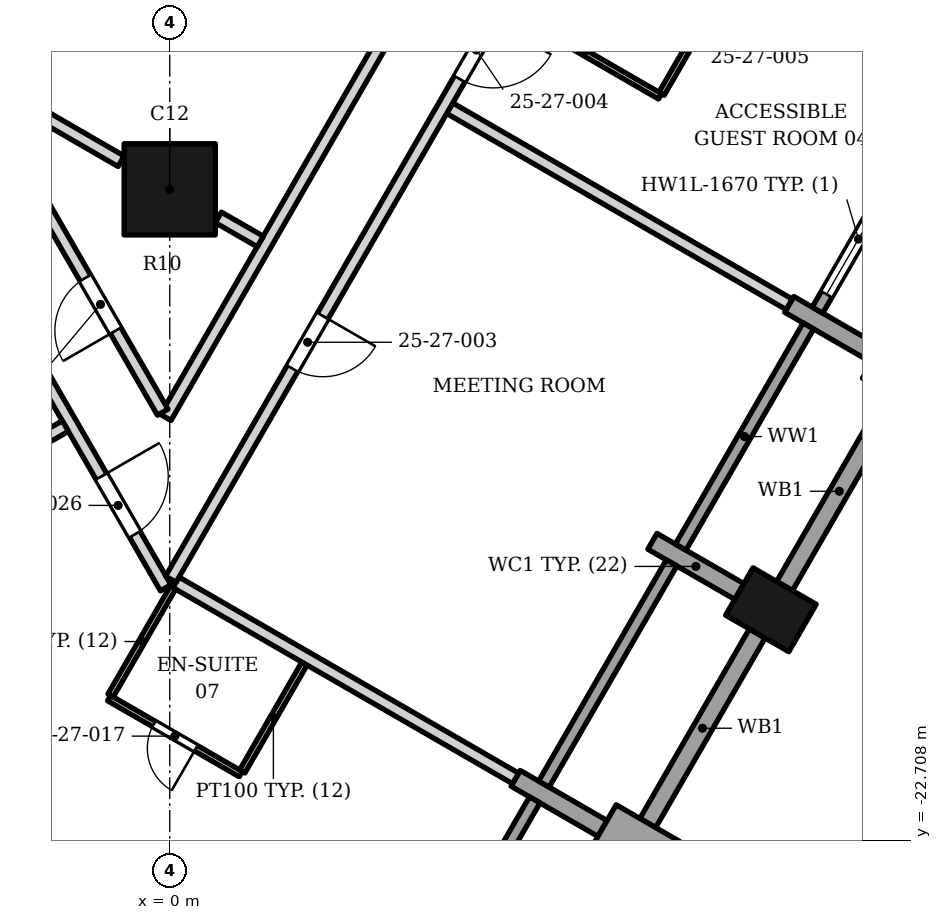
"""IFC4 building model, lengths in metres.
Left out: names, types, materials, properties, quantities, classifications, styles, units other than length and angle.
Written with IfcOpenShell. Run it as: python <this file> out.ifc"""

import sys

from ifc_helpers import new_model, si_unit, direction, frame, frame_2d, origin, origin_2d, place, context, subcontext, project, spatial, rectangle, extrude, element, fill, save


model = new_model("IFC4")
c1 = context("Model", 3, precision=1e-05, world=origin(), true_north=direction((0.0, 1.0)))
c2 = subcontext(c1, "Body", "Model", "MODEL_VIEW")
j1 = project(units=[si_unit("LENGTHUNIT", "METRE"), si_unit("PLANEANGLEUNIT", "RADIAN")], contexts=[c1])
p1 = place(None, origin())
s1 = spatial("IfcSite", under=j1, at=p1, CompositionType="ELEMENT")
p2 = place(p1, origin())
s2 = spatial("IfcBuilding", under=s1, at=p2, CompositionType="ELEMENT")
p3 = place(p2, frame((0.0, 0.0, 112.2)))
s3 = spatial("IfcBuildingStorey", under=s2, at=p3, CompositionType="ELEMENT", Elevation=112.2)
p4 = place(p3, frame((0.0, -12.0, 0.0), z_axis=(0.0, 0.0, 1.0), x_axis=(1.0, 0.0, 0.0)))
e1 = element("IfcColumn", 1, at=p4, inside=s3, PredefinedType="COLUMN", context=c2, shape_type="SweptSolid", body=[
    extrude(rectangle(XDim=1.5, YDim=1.5, at=origin_2d()), origin(), (0.0, 0.0, 1.0), 3.4),
])
p5 = place(p3, frame((9.887, -18.914, 0.0), z_axis=(0.0, 0.0, 1.0), x_axis=(0.5, 0.866025403784, 0.0)))
e2 = element("IfcColumn", 2, at=p5, inside=s3, PredefinedType="COLUMN", context=c2, shape_type="SweptSolid", body=[
    extrude(rectangle(XDim=0.9, YDim=1.2, at=origin_2d()), origin(), (0.0, 0.0, 1.0), 3.4),
])
p6 = place(p3, frame((8.156, -23.111, 0.0), z_axis=(0.0, 0.0, 1.0), x_axis=(-0.866006032174, 0.500033551112, 0.0)))
e3 = element("IfcWall", 3, at=p6, inside=s3, PredefinedType="SOLIDWALL", context=c2, shape_type="SweptSolid", body=[
    extrude(rectangle(XDim=1.2, YDim=0.9, at=frame_2d((0.6, 0.0))), origin(), (0.0, 0.0, 1.0), 2.63),
])
for number, where, z_axis, x_axis in (
    (4, (7.117, -22.511, 0.0), (0.0, 0.0, 1.0), (-0.866, 0.5, 0.0)),
    (5, (7.938, -17.789, 0.0), (0.0, 0.0, 1.0), (0.866, -0.5, 0.0)),
):
    element("IfcWall", number, at=place(p3, frame(where, z_axis=z_axis, x_axis=x_axis)), inside=s3, PredefinedType="SOLIDWALL", context=c2, shape_type="SweptSolid", body=[
        extrude(rectangle(XDim=1.65, YDim=0.3, at=frame_2d((0.825, 0.0))), origin(), (0.0, 0.0, 1.0), 2.65),
    ])
p7 = place(p3, frame((12.656, -15.317, 0.0), z_axis=(0.0, 0.0, 1.0), x_axis=(-0.866006032174, 0.500033551112, 0.0)))
e6 = element("IfcWall", 6, at=p7, inside=s3, PredefinedType="SOLIDWALL", context=c2, shape_type="SweptSolid", body=[
    extrude(rectangle(XDim=1.2, YDim=0.9, at=frame_2d((0.6, 0.0))), origin(), (0.0, 0.0, 1.0), 2.63),
])
p8 = place(p3, frame((11.617, -14.717, 0.0), z_axis=(0.0, 0.0, 1.0), x_axis=(-0.866040211805, 0.499974350878, 0.0)))
e7 = element("IfcWall", 7, at=p8, inside=s3, PredefinedType="SOLIDWALL", context=c2, shape_type="SweptSolid", body=[
    extrude(rectangle(XDim=1.65, YDim=0.3, at=frame_2d((0.825, 0.0))), origin(), (0.0, 0.0, 1.0), 2.65),
])
p9 = place(p3, frame((3.903, -25.678, 0.0), z_axis=(0.0, 0.0, 1.0), x_axis=(0.49998411664, 0.866034573852, 0.0)))
e8 = element("IfcWall", 8, at=p9, inside=s3, PredefinedType="ELEMENTEDWALL", context=c2, shape_type="SweptSolid", body=[
    extrude(rectangle(XDim=4.2, YDim=0.2, at=frame_2d((2.1, 0.0))), origin(), (0.0, 0.0, 1.0), 2.552),
])
p10 = place(p3, frame((7.862, -22.421, 0.0), z_axis=(0.0, 0.0, 1.0), x_axis=(0.500012057535, 0.866018442252, 0.0)))
e9 = element("IfcWall", 9, at=p10, inside=s3, PredefinedType="SOLIDWALL", context=c2, shape_type="SweptSolid", body=[
    extrude(rectangle(XDim=3.6, YDim=0.3, at=frame_2d((1.8, 0.0))), origin(), (0.0, 0.0, 1.0), 2.63),
])
p11 = place(p3, frame((6.153, -21.781, 0.0), z_axis=(0.0, 0.0, 1.0), x_axis=(0.499958946799, 0.866049104564, 0.0)))
e10 = element("IfcWall", 10, at=p11, inside=s3, PredefinedType="ELEMENTEDWALL", context=c2, shape_type="SweptSolid", body=[
    extrude(rectangle(XDim=4.2, YDim=0.2, at=frame_2d((2.1, 0.0))), origin(), (0.0, 0.0, 1.0), 2.65),
])
p12 = place(p3, frame((10.112, -18.524, 0.0), z_axis=(0.0, 0.0, 1.0), x_axis=(0.500012057535, 0.866018442252, 0.0)))
e11 = element("IfcWall", 11, at=p12, inside=s3, PredefinedType="SOLIDWALL", context=c2, shape_type="SweptSolid", body=[
    extrude(rectangle(XDim=3.6, YDim=0.3, at=frame_2d((1.8, 0.0))), origin(), (0.0, 0.0, 1.0), 2.63),
])
p13 = place(p3, frame((8.403, -17.884, 0.0), z_axis=(0.0, 0.0, 1.0), x_axis=(0.49998411664, 0.866034573852, 0.0)))
e12 = element("IfcWall", 12, at=p13, inside=s3, PredefinedType="ELEMENTEDWALL", context=c2, shape_type="SweptSolid", body=[
    extrude(rectangle(XDim=4.2, YDim=0.2, at=frame_2d((2.1, 0.0))), origin(), (0.0, 0.0, 1.0), 2.65),
])
p14 = place(p3, frame((10.653, -13.987, 0.0), z_axis=(0.0, 0.0, 1.0), x_axis=(0.499958946799, 0.866049104564, 0.0)))
e13 = element("IfcWall", 13, at=p14, inside=s3, PredefinedType="ELEMENTEDWALL", context=c2, shape_type="SweptSolid", body=[
    extrude(rectangle(XDim=4.2, YDim=0.2, at=frame_2d((2.1, 0.0))), origin(), (0.0, 0.0, 1.0), 2.374),
])
p15 = place(p14, frame((0.3, 0.0, 0.6)))
e14 = element("IfcOpeningElement", 14, at=p15, cuts=e13, PredefinedType="OPENING", context=c2, shape_type="SweptSolid", body=[
    extrude(rectangle(XDim=2.1, YDim=1.67, at=frame_2d((1.05, 0.835))), frame((0.0, 0.11, 0.0), z_axis=(0.0, -1.0, 0.0), x_axis=(1.0, 0.0, 0.0)), (0.0, 0.0, 1.0), 0.22),
])
p16 = place(p14, frame((2.7, 0.0, 0.0)))
e15 = element("IfcOpeningElement", 15, at=p16, cuts=e13, PredefinedType="OPENING", context=c2, shape_type="SweptSolid", body=[
    extrude(rectangle(XDim=1.2, YDim=2.27, at=frame_2d((0.6, 1.135))), frame((0.0, 0.11, 0.0), z_axis=(0.0, -1.0, 0.0), x_axis=(1.0, 0.0, 0.0)), (0.0, 0.0, 1.0), 0.22),
])
p17 = place(p3, frame((1.193, -21.573, 0.0), z_axis=(0.0, 0.0, 1.0), x_axis=(0.499354689006, 0.866397653833, 0.0)))
e16 = element("IfcWall", 16, at=p17, inside=s3, PredefinedType="PARTITIONING", context=c2, shape_type="SweptSolid", body=[
    extrude(rectangle(XDim=2.05, YDim=0.1, at=frame_2d((1.025, 0.0))), origin(), (0.0, 0.0, 1.0), 3.23),
])
p18 = place(p3, frame((-0.997, -20.367, 0.0), z_axis=(0.0, 0.0, 1.0), x_axis=(0.866022959057, -0.500004234368, 0.0)))
e17 = element("IfcWall", 17, at=p18, inside=s3, PredefinedType="PARTITIONING", context=c2, shape_type="SweptSolid", body=[
    extrude(rectangle(XDim=2.5, YDim=0.1, at=frame_2d((1.25, 0.0))), origin(), (0.0, 0.0, 1.0), 2.552),
])
p19 = place(p18, frame((0.85, 0.0, 0.0)))
e18 = element("IfcOpeningElement", 18, at=p19, cuts=e17, PredefinedType="OPENING", context=c2, shape_type="SweptSolid", body=[
    extrude(rectangle(XDim=0.8, YDim=2.1, at=frame_2d((0.4, 1.05))), frame((0.0, 0.06, 0.0), z_axis=(0.0, -1.0, 0.0), x_axis=(1.0, 0.0, 0.0)), (0.0, 0.0, 1.0), 0.12),
])
p20 = place(p3, frame((-12.882, 3.644, 0.0), z_axis=(0.0, 0.0, 1.0), x_axis=(0.500000325599, -0.866025215799, 0.0)))
e19 = element("IfcWall", 19, at=p20, inside=s3, PredefinedType="PARTITIONING", context=c2, shape_type="SweptSolid", body=[
    extrude(rectangle(XDim=25.63, YDim=0.2, at=frame_2d((12.815, 0.0))), origin(), (0.0, 0.0, 1.0), 2.384),
])
p21 = place(p20, frame((4.0, 0.0, 0.0)))
e20 = element("IfcOpeningElement", 20, at=p21, cuts=e19, PredefinedType="OPENING", context=c2, shape_type="SweptSolid", body=[
    extrude(rectangle(XDim=1.0, YDim=2.1, at=frame_2d((0.5, 1.05))), frame((0.0, 0.11, 0.0), z_axis=(0.0, -1.0, 0.0), x_axis=(1.0, 0.0, 0.0)), (0.0, 0.0, 1.0), 0.22),
])
p22 = place(p20, frame((14.95, 0.0, 0.0)))
e21 = element("IfcOpeningElement", 21, at=p22, cuts=e19, PredefinedType="OPENING", context=c2, shape_type="SweptSolid", body=[
    extrude(rectangle(XDim=1.6, YDim=2.1, at=frame_2d((0.8, 1.05))), frame((0.0, 0.11, 0.0), z_axis=(0.0, -1.0, 0.0), x_axis=(1.0, 0.0, 0.0)), (0.0, 0.0, 1.0), 0.22),
])
p23 = place(p20, frame((23.515, 0.0, 0.0)))
e22 = element("IfcOpeningElement", 22, at=p23, cuts=e19, PredefinedType="OPENING", context=c2, shape_type="SweptSolid", body=[
    extrude(rectangle(XDim=1.1, YDim=2.1, at=frame_2d((0.55, 1.05))), frame((0.0, 0.11, 0.0), z_axis=(0.0, -1.0, 0.0), x_axis=(1.0, 0.0, 0.0)), (0.0, 0.0, 1.0), 0.22),
])
p24 = place(p3, frame((-0.972, -20.323, 0.0), z_axis=(0.0, 0.0, 1.0), x_axis=(0.500646589026, 0.865651773461, 0.0)))
e23 = element("IfcWall", 23, at=p24, inside=s3, PredefinedType="PARTITIONING", context=c2, shape_type="SweptSolid", body=[
    extrude(rectangle(XDim=2.05, YDim=0.1, at=frame_2d((1.025, 0.0))), origin(), (0.0, 0.0, 1.0), 2.552),
])
p25 = place(p3, frame((0.102, -18.463, 0.0), z_axis=(0.0, 0.0, 1.0), x_axis=(0.866035557451, -0.499982412921, 0.0)))
e24 = element("IfcWall", 24, at=p25, inside=s3, PredefinedType="PARTITIONING", context=c2, shape_type="SweptSolid", body=[
    extrude(rectangle(XDim=6.449, YDim=0.2, at=frame_2d((3.225, 0.0))), origin(), (0.0, 0.0, 1.0), 2.552),
])
p26 = place(p3, frame((-6.09, -18.416, 0.0), z_axis=(0.0, 0.0, 1.0), x_axis=(0.866164656326, 0.49975872992, 0.0)))
e25 = element("IfcWall", 25, at=p26, inside=s3, PredefinedType="PARTITIONING", context=c2, shape_type="SweptSolid", body=[
    extrude(rectangle(XDim=5.049, YDim=0.2, at=frame_2d((2.525, 0.0))), origin(), (0.0, 0.0, 1.0), 2.628),
])
p27 = place(p3, frame((-0.065, -15.751, 0.0), z_axis=(0.0, 0.0, 1.0), x_axis=(0.499524753178, 0.866299613854, 0.0)))
e26 = element("IfcWall", 26, at=p27, inside=s3, PredefinedType="PARTITIONING", context=c2, shape_type="SweptSolid", body=[
    extrude(rectangle(XDim=12.83, YDim=0.2, at=frame_2d((6.415, 0.0))), origin(), (0.0, 0.0, 1.0), 2.374),
])
p28 = place(p27, frame((7.556, 0.0, 0.0)))
e27 = element("IfcOpeningElement", 27, at=p28, cuts=e26, PredefinedType="OPENING", context=c2, shape_type="SweptSolid", body=[
    extrude(rectangle(XDim=1.0, YDim=2.1, at=frame_2d((0.5, 1.05))), frame((0.0, 0.11, 0.0), z_axis=(0.0, -1.0, 0.0), x_axis=(1.0, 0.0, 0.0)), (0.0, 0.0, 1.0), 0.22),
])
p29 = place(p3, frame((0.8, -12.462, 0.0), z_axis=(0.0, 0.0, 1.0), x_axis=(0.867012419422, -0.498286528584, 0.0)))
e28 = element("IfcWall", 28, at=p29, inside=s3, PredefinedType="PARTITIONING", context=c2, shape_type="SweptSolid", body=[
    extrude(rectangle(XDim=0.795, YDim=0.2, at=frame_2d((0.397, 0.0))), origin(), (0.0, 0.0, 1.0), 3.23),
])
p30 = place(p3, frame((-2.311, -11.861, 0.0), z_axis=(0.0, 0.0, 1.0), x_axis=(0.499977492351, -0.866038398192, 0.0)))
e29 = element("IfcWall", 29, at=p30, inside=s3, PredefinedType="PARTITIONING", context=c2, shape_type="SweptSolid", body=[
    extrude(rectangle(XDim=4.392, YDim=0.2, at=frame_2d((2.196, 0.0))), origin(), (0.0, 0.0, 1.0), 2.45),
])
p31 = place(p30, frame((1.844, 0.0, 0.0)))
e30 = element("IfcOpeningElement", 30, at=p31, cuts=e29, PredefinedType="OPENING", context=c2, shape_type="SweptSolid", body=[
    extrude(rectangle(XDim=1.0, YDim=2.1, at=frame_2d((0.5, 1.05))), frame((0.0, 0.11, 0.0), z_axis=(0.0, -1.0, 0.0), x_axis=(1.0, 0.0, 0.0)), (0.0, 0.0, 1.0), 0.22),
])
p32 = place(p3, frame((-2.225, -10.714, 0.0), z_axis=(0.0, 0.0, 1.0), x_axis=(0.865565051919, -0.500796506474, 0.0)))
e31 = element("IfcWall", 31, at=p32, inside=s3, PredefinedType="PARTITIONING", context=c2, shape_type="SweptSolid", body=[
    extrude(rectangle(XDim=1.646, YDim=0.2, at=frame_2d((0.823, 0.0))), origin(), (0.0, 0.0, 1.0), 3.23),
])
p33 = place(p3, frame((4.604, -10.665, 0.0), z_axis=(0.0, 0.0, 1.0), x_axis=(0.865901871826, -0.500213902613, 0.0)))
e32 = element("IfcWall", 32, at=p33, inside=s3, PredefinedType="PARTITIONING", context=c2, shape_type="SweptSolid", body=[
    extrude(rectangle(XDim=6.45, YDim=0.2, at=frame_2d((3.225, 0.0))), origin(), (0.0, 0.0, 1.0), 2.374),
])
p34 = place(p3, frame((8.089, -10.428, 0.0), z_axis=(0.0, 0.0, 1.0), x_axis=(0.500018594424, 0.866014668023, 0.0)))
e33 = element("IfcWall", 33, at=p34, inside=s3, PredefinedType="PARTITIONING", context=c2, shape_type="SweptSolid", body=[
    extrude(rectangle(XDim=2.45, YDim=0.1, at=frame_2d((1.225, 0.0))), origin(), (0.0, 0.0, 1.0), 2.552),
])
p35 = place(p34, frame((0.8, 0.0, 0.0)))
e34 = element("IfcOpeningElement", 34, at=p35, cuts=e33, PredefinedType="OPENING", context=c2, shape_type="SweptSolid", body=[
    extrude(rectangle(XDim=0.9, YDim=2.1, at=frame_2d((0.45, 1.05))), frame((0.0, 0.06, 0.0), z_axis=(0.0, -1.0, 0.0), x_axis=(1.0, 0.0, 0.0)), (0.0, 0.0, 1.0), 0.12),
])
p36 = place(p3, frame((5.553, -9.02, 0.0), z_axis=(0.0, 0.0, 1.0), x_axis=(0.865729701078, -0.500511822708, 0.0)))
e35 = element("IfcWall", 35, at=p36, inside=s3, PredefinedType="PARTITIONING", context=c2, shape_type="SweptSolid", body=[
    extrude(rectangle(XDim=2.9, YDim=0.1, at=frame_2d((1.45, 0.0))), origin(), (0.0, 0.0, 1.0), 3.23),
])
p37 = place(p3, frame((6.854, -6.768, 0.0), z_axis=(0.0, 0.0, 1.0), x_axis=(0.866012238917, -0.500022801525, 0.0)))
e36 = element("IfcWall", 36, at=p37, inside=s3, PredefinedType="PARTITIONING", context=c2, shape_type="SweptSolid", body=[
    extrude(rectangle(XDim=6.45, YDim=0.2, at=frame_2d((3.225, 0.0))), origin(), (0.0, 0.0, 1.0), 2.552),
])
p38 = place(p3, frame((0.018, -18.412, 0.0), z_axis=(0.0, 0.0, 1.0), x_axis=(0.49999953585, 0.866025671762, 0.0)))
e37 = element("IfcWall", 37, at=p38, inside=s3, PredefinedType="PARTITIONING", context=c2, shape_type="SweptSolid", body=[
    extrude(rectangle(XDim=22.5, YDim=0.2, at=frame_2d((11.25, 0.0))), origin(), (0.0, 0.0, 1.0), 2.374),
])
p39 = place(p38, frame((4.0, 0.0, 0.0)))
e38 = element("IfcOpeningElement", 38, at=p39, cuts=e37, PredefinedType="OPENING", context=c2, shape_type="SweptSolid", body=[
    extrude(rectangle(XDim=1.0, YDim=2.1, at=frame_2d((0.5, 1.05))), frame((0.0, 0.11, 0.0), z_axis=(0.0, -1.0, 0.0), x_axis=(1.0, 0.0, 0.0)), (0.0, 0.0, 1.0), 0.22),
])
p40 = place(p38, frame((9.5, 0.0, 0.0)))
e39 = element("IfcOpeningElement", 39, at=p40, cuts=e37, PredefinedType="OPENING", context=c2, shape_type="SweptSolid", body=[
    extrude(rectangle(XDim=1.1, YDim=2.1, at=frame_2d((0.55, 1.05))), frame((0.0, 0.11, 0.0), z_axis=(0.0, -1.0, 0.0), x_axis=(1.0, 0.0, 0.0)), (0.0, 0.0, 1.0), 0.22),
])
p41 = place(p38, frame((16.3, 0.0, 0.0)))
e40 = element("IfcOpeningElement", 40, at=p41, cuts=e37, PredefinedType="OPENING", context=c2, shape_type="SweptSolid", body=[
    extrude(rectangle(XDim=1.0, YDim=2.1, at=frame_2d((0.5, 1.05))), frame((0.0, 0.11, 0.0), z_axis=(0.0, -1.0, 0.0), x_axis=(1.0, 0.0, 0.0)), (0.0, 0.0, 1.0), 0.22),
])
p42 = place(p38, frame((18.7, 0.0, 0.0)))
e41 = element("IfcOpeningElement", 41, at=p42, cuts=e37, PredefinedType="OPENING", context=c2, shape_type="SweptSolid", body=[
    extrude(rectangle(XDim=1.0, YDim=2.1, at=frame_2d((0.5, 1.05))), frame((0.0, 0.11, 0.0), z_axis=(0.0, -1.0, 0.0), x_axis=(1.0, 0.0, 0.0)), (0.0, 0.0, 1.0), 0.22),
])
p43 = place(p15, origin())
e42 = element("IfcWindow", 42, at=p43, inside=s3, PartitioningType="SINGLE_PANEL", PredefinedType="WINDOW", context=c2, shape_type="SweptSolid", body=[
    extrude(rectangle(XDim=2.1, YDim=1.67, at=frame_2d((1.05, 0.835))), frame((0.0, 0.03, 0.0), z_axis=(0.0, -1.0, 0.0), x_axis=(1.0, 0.0, 0.0)), (0.0, 0.0, 1.0), 0.06),
])
fill(e14, e42)
p44 = place(p39, origin())
e43 = element("IfcDoor", 43, at=p44, inside=s3, OperationType="SINGLE_SWING_RIGHT", PredefinedType="DOOR", context=c2, shape_type="SweptSolid", body=[
    extrude(rectangle(XDim=1.0, YDim=2.1, at=frame_2d((0.5, 1.05))), frame((0.0, 0.025, 0.0), z_axis=(0.0, -1.0, 0.0), x_axis=(1.0, 0.0, 0.0)), (0.0, 0.0, 1.0), 0.05),
])
fill(e38, e43)
p45 = place(p40, origin())
e44 = element("IfcDoor", 44, at=p45, inside=s3, OperationType="SINGLE_SWING_RIGHT", PredefinedType="DOOR", context=c2, shape_type="SweptSolid", body=[
    extrude(rectangle(XDim=1.1, YDim=2.1, at=frame_2d((0.55, 1.05))), frame((0.0, 0.025, 0.0), z_axis=(0.0, -1.0, 0.0), x_axis=(1.0, 0.0, 0.0)), (0.0, 0.0, 1.0), 0.05),
])
fill(e39, e44)
p46 = place(p31, origin())
e45 = element("IfcDoor", 45, at=p46, inside=s3, OperationType="SINGLE_SWING_RIGHT", PredefinedType="DOOR", context=c2, shape_type="SweptSolid", body=[
    extrude(rectangle(XDim=1.0, YDim=2.1, at=frame_2d((0.5, 1.05))), frame((0.0, 0.025, 0.0), z_axis=(0.0, -1.0, 0.0), x_axis=(1.0, 0.0, 0.0)), (0.0, 0.0, 1.0), 0.05),
])
fill(e30, e45)
p47 = place(p19, origin())
e46 = element("IfcDoor", 46, at=p47, inside=s3, OperationType="SINGLE_SWING_RIGHT", PredefinedType="DOOR", context=c2, shape_type="SweptSolid", body=[
    extrude(rectangle(XDim=0.8, YDim=2.1, at=frame_2d((0.4, 1.05))), frame((0.0, 0.025, 0.0), z_axis=(0.0, -1.0, 0.0), x_axis=(1.0, 0.0, 0.0)), (0.0, 0.0, 1.0), 0.05),
])
fill(e18, e46)
p48 = place(p23, origin())
e47 = element("IfcDoor", 47, at=p48, inside=s3, OperationType="SINGLE_SWING_LEFT", PredefinedType="DOOR", context=c2, shape_type="SweptSolid", body=[
    extrude(rectangle(XDim=1.1, YDim=2.1, at=frame_2d((0.55, 1.05))), frame((0.0, 0.025, 0.0), z_axis=(0.0, -1.0, 0.0), x_axis=(1.0, 0.0, 0.0)), (0.0, 0.0, 1.0), 0.05),
])
fill(e22, e47)
save(model, sys.argv[1])
